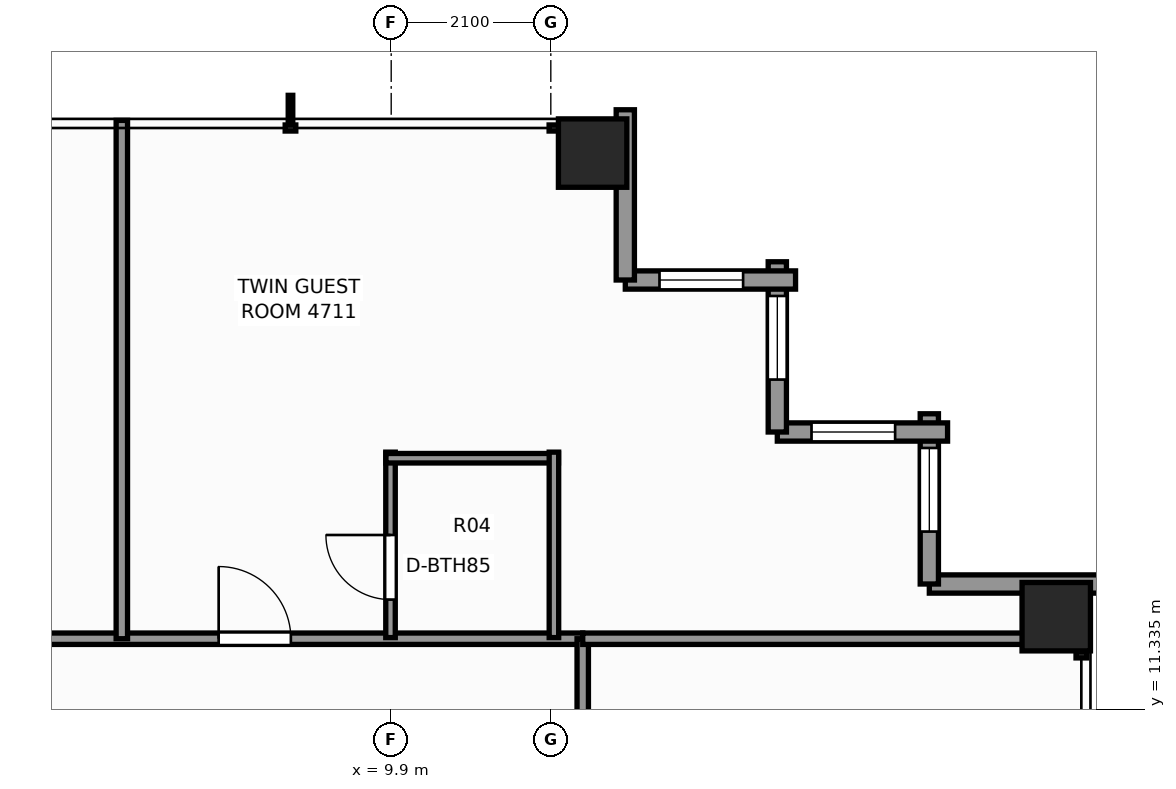
"""IFC4 building model, lengths in metres.
Left out: names, types, materials, properties, quantities, classifications, styles, units other than length and angle.
Written with IfcOpenShell. Run it as: python <this file> out.ifc"""

import sys

from ifc_helpers import new_model, si_unit, direction, frame, frame_2d, origin, origin_2d, place, context, subcontext, project, spatial, rectangle, extrude, element, fill, save


model = new_model("IFC4")
c1 = context("Model", 3, precision=1e-05, world=origin(), true_north=direction((0.0, 1.0)))
c2 = subcontext(c1, "Body", "Model", "MODEL_VIEW")
j1 = project(units=[si_unit("LENGTHUNIT", "METRE"), si_unit("PLANEANGLEUNIT", "RADIAN")], contexts=[c1])
p1 = place(None, origin())
s1 = spatial("IfcSite", under=j1, at=p1, CompositionType="ELEMENT")
p2 = place(p1, origin())
s2 = spatial("IfcBuilding", under=s1, at=p2, CompositionType="ELEMENT")
p3 = place(p2, frame((0.0, 0.0, 163.5)))
s3 = spatial("IfcBuildingStorey", under=s2, at=p3, CompositionType="ELEMENT", Elevation=163.5)
for number, where, z_axis, x_axis in (
    (1, (12.55, 18.65, 0.0), (0.0, 0.0, 1.0), (1.0, 0.0, 0.0)),
    (2, (18.65, 12.55, 0.0), (0.0, 0.0, 1.0), (1.0, 0.0, 0.0)),
):
    element("IfcColumn", number, at=place(p3, frame(where, z_axis=z_axis, x_axis=x_axis)), inside=s3, PredefinedType="COLUMN", context=c2, shape_type="SweptSolid", body=[
        extrude(rectangle(XDim=0.9, YDim=0.9, at=origin_2d()), origin(), (0.0, 0.0, 1.0), 3.3),
    ])
p4 = place(p3, frame((16.98, 12.98, 0.0), z_axis=(0.0, 0.0, 1.0), x_axis=(1.0, 0.0, 0.0)))
e3 = element("IfcWall", 3, at=p4, inside=s3, PredefinedType="STANDARD", context=c2, shape_type="SweptSolid", body=[
    extrude(rectangle(XDim=2.24, YDim=0.24, at=frame_2d((1.12, 0.0))), origin(), (0.0, 0.0, 1.0), 2.483),
])
p5 = place(p3, frame((16.98, 15.22, 0.0), z_axis=(0.0, 0.0, 1.0), x_axis=(0.0, -1.0, 0.0)))
e4 = element("IfcWall", 4, at=p5, inside=s3, PredefinedType="STANDARD", context=c2, shape_type="SweptSolid", body=[
    extrude(rectangle(XDim=2.24, YDim=0.24, at=frame_2d((1.12, 0.0))), origin(), (0.0, 0.0, 1.0), 2.483),
])
p6 = place(p5, frame((0.45, 0.0, 0.65)))
e5 = element("IfcOpeningElement", 5, at=p6, cuts=e4, PredefinedType="OPENING", context=c2, shape_type="SweptSolid", body=[
    extrude(rectangle(XDim=1.1, YDim=1.45, at=frame_2d((0.55, 0.725))), frame((0.0, 0.13, 0.0), z_axis=(0.0, -1.0, 0.0), x_axis=(1.0, 0.0, 0.0)), (0.0, 0.0, 1.0), 0.26),
])
p7 = place(p3, frame((14.98, 14.98, 0.0), z_axis=(0.0, 0.0, 1.0), x_axis=(1.0, 0.0, 0.0)))
e6 = element("IfcWall", 6, at=p7, inside=s3, PredefinedType="STANDARD", context=c2, shape_type="SweptSolid", body=[
    extrude(rectangle(XDim=2.24, YDim=0.24, at=frame_2d((1.12, 0.0))), origin(), (0.0, 0.0, 1.0), 2.483),
])
p8 = place(p7, frame((0.45, 0.0, 0.65)))
e7 = element("IfcOpeningElement", 7, at=p8, cuts=e6, PredefinedType="OPENING", context=c2, shape_type="SweptSolid", body=[
    extrude(rectangle(XDim=1.1, YDim=1.45, at=frame_2d((0.55, 0.725))), frame((0.0, 0.13, 0.0), z_axis=(0.0, -1.0, 0.0), x_axis=(1.0, 0.0, 0.0)), (0.0, 0.0, 1.0), 0.26),
])
p9 = place(p3, frame((14.98, 17.22, 0.0), z_axis=(0.0, 0.0, 1.0), x_axis=(0.0, -1.0, 0.0)))
e8 = element("IfcWall", 8, at=p9, inside=s3, PredefinedType="STANDARD", context=c2, shape_type="SweptSolid", body=[
    extrude(rectangle(XDim=2.24, YDim=0.24, at=frame_2d((1.12, 0.0))), origin(), (0.0, 0.0, 1.0), 2.483),
])
p10 = place(p9, frame((0.45, 0.0, 0.65)))
e9 = element("IfcOpeningElement", 9, at=p10, cuts=e8, PredefinedType="OPENING", context=c2, shape_type="SweptSolid", body=[
    extrude(rectangle(XDim=1.1, YDim=1.45, at=frame_2d((0.55, 0.725))), frame((0.0, 0.13, 0.0), z_axis=(0.0, -1.0, 0.0), x_axis=(1.0, 0.0, 0.0)), (0.0, 0.0, 1.0), 0.26),
])
p11 = place(p3, frame((12.98, 16.98, 0.0), z_axis=(0.0, 0.0, 1.0), x_axis=(1.0, 0.0, 0.0)))
e10 = element("IfcWall", 10, at=p11, inside=s3, PredefinedType="STANDARD", context=c2, shape_type="SweptSolid", body=[
    extrude(rectangle(XDim=2.24, YDim=0.24, at=frame_2d((1.12, 0.0))), origin(), (0.0, 0.0, 1.0), 2.483),
])
p12 = place(p11, frame((0.45, 0.0, 0.65)))
e11 = element("IfcOpeningElement", 11, at=p12, cuts=e10, PredefinedType="OPENING", context=c2, shape_type="SweptSolid", body=[
    extrude(rectangle(XDim=1.1, YDim=1.45, at=frame_2d((0.55, 0.725))), frame((0.0, 0.13, 0.0), z_axis=(0.0, -1.0, 0.0), x_axis=(1.0, 0.0, 0.0)), (0.0, 0.0, 1.0), 0.26),
])
p13 = place(p3, frame((12.98, 19.22, 0.0), z_axis=(0.0, 0.0, 1.0), x_axis=(0.0, -1.0, 0.0)))
e12 = element("IfcWall", 12, at=p13, inside=s3, PredefinedType="STANDARD", context=c2, shape_type="SweptSolid", body=[
    extrude(rectangle(XDim=2.24, YDim=0.24, at=frame_2d((1.12, 0.0))), origin(), (0.0, 0.0, 1.0), 2.483),
])
p14 = place(p3, frame((-12.42, 12.26, 0.0), z_axis=(0.0, 0.0, 1.0), x_axis=(1.0, 0.0, 0.0)))
e13 = element("IfcWall", 13, at=p14, inside=s3, PredefinedType="PARTITIONING", context=c2, shape_type="SweptSolid", body=[
    extrude(rectangle(XDim=24.84, YDim=0.15, at=frame_2d((12.42, 0.0))), origin(), (0.0, 0.0, 1.0), 2.389),
])
p15 = place(p14, frame((3.541, 0.0, 0.0)))
e14 = element("IfcOpeningElement", 14, at=p15, cuts=e13, PredefinedType="OPENING", context=c2, shape_type="SweptSolid", body=[
    extrude(rectangle(XDim=0.95, YDim=2.06, at=frame_2d((0.475, 1.03))), frame((0.0, 0.085, 0.0), z_axis=(0.0, -1.0, 0.0), x_axis=(1.0, 0.0, 0.0)), (0.0, 0.0, 1.0), 0.17),
])
p16 = place(p14, frame((13.975, 0.0, 0.0)))
e15 = element("IfcOpeningElement", 15, at=p16, cuts=e13, PredefinedType="OPENING", context=c2, shape_type="SweptSolid", body=[
    extrude(rectangle(XDim=0.95, YDim=2.06, at=frame_2d((0.475, 1.03))), frame((0.0, 0.085, 0.0), z_axis=(0.0, -1.0, 0.0), x_axis=(1.0, 0.0, 0.0)), (0.0, 0.0, 1.0), 0.17),
])
p17 = place(p14, frame((20.05, 0.0, 0.0)))
e16 = element("IfcOpeningElement", 16, at=p17, cuts=e13, PredefinedType="OPENING", context=c2, shape_type="SweptSolid", body=[
    extrude(rectangle(XDim=0.95, YDim=2.06, at=frame_2d((0.475, 1.03))), frame((0.0, 0.085, 0.0), z_axis=(0.0, -1.0, 0.0), x_axis=(1.0, 0.0, 0.0)), (0.0, 0.0, 1.0), 0.17),
])
p18 = place(p3, frame((12.42, -12.58, 0.0), z_axis=(0.0, 0.0, 1.0), x_axis=(0.0, 1.0, 0.0)))
e17 = element("IfcWall", 17, at=p18, inside=s3, PredefinedType="PARTITIONING", context=c2, shape_type="SweptSolid", body=[
    extrude(rectangle(XDim=24.84, YDim=0.15, at=frame_2d((12.42, 0.0))), origin(), (0.0, 0.0, 1.0), 2.389),
])
p19 = place(p18, frame((4.595, 0.0, 0.0)))
e18 = element("IfcOpeningElement", 18, at=p19, cuts=e17, PredefinedType="OPENING", context=c2, shape_type="SweptSolid", body=[
    extrude(rectangle(XDim=0.9, YDim=2.06, at=frame_2d((0.45, 1.03))), frame((0.0, 0.085, 0.0), z_axis=(0.0, -1.0, 0.0), x_axis=(1.0, 0.0, 0.0)), (0.0, 0.0, 1.0), 0.17),
])
p20 = place(p18, frame((14.16, 0.0, 0.0)))
e19 = element("IfcOpeningElement", 19, at=p20, cuts=e17, PredefinedType="OPENING", context=c2, shape_type="SweptSolid", body=[
    extrude(rectangle(XDim=0.9, YDim=2.06, at=frame_2d((0.45, 1.03))), frame((0.0, 0.085, 0.0), z_axis=(0.0, -1.0, 0.0), x_axis=(1.0, 0.0, 0.0)), (0.0, 0.0, 1.0), 0.17),
])
p21 = place(p18, frame((18.919, 0.0, 0.0)))
e20 = element("IfcOpeningElement", 20, at=p21, cuts=e17, PredefinedType="OPENING", context=c2, shape_type="SweptSolid", body=[
    extrude(rectangle(XDim=0.9, YDim=2.06, at=frame_2d((0.45, 1.03))), frame((0.0, 0.085, 0.0), z_axis=(0.0, -1.0, 0.0), x_axis=(1.0, 0.0, 0.0)), (0.0, 0.0, 1.0), 0.17),
])
p22 = place(p18, frame((21.254, 0.0, 0.0)))
e21 = element("IfcOpeningElement", 21, at=p22, cuts=e17, PredefinedType="OPENING", context=c2, shape_type="SweptSolid", body=[
    extrude(rectangle(XDim=0.9, YDim=2.06, at=frame_2d((0.45, 1.03))), frame((0.0, 0.085, 0.0), z_axis=(0.0, -1.0, 0.0), x_axis=(1.0, 0.0, 0.0)), (0.0, 0.0, 1.0), 0.17),
])
p23 = place(p3, frame((12.42, 12.26, 0.0), z_axis=(0.0, 0.0, 1.0), x_axis=(1.0, 0.0, 0.0)))
e22 = element("IfcWall", 22, at=p23, inside=s3, PredefinedType="PARTITIONING", context=c2, shape_type="SweptSolid", body=[
    extrude(rectangle(XDim=6.66, YDim=0.15, at=frame_2d((3.33, 0.0))), origin(), (0.0, 0.0, 1.0), 2.389),
])
p24 = place(p3, frame((6.356, 12.26, 0.0), z_axis=(0.0, 0.0, 1.0), x_axis=(0.0, 1.0, 0.0)))
e23 = element("IfcWall", 23, at=p24, inside=s3, PredefinedType="PARTITIONING", context=c2, shape_type="SweptSolid", body=[
    extrude(rectangle(XDim=6.82, YDim=0.15, at=frame_2d((3.41, 0.0))), origin(), (0.0, 0.0, 1.0), 2.473),
])
p25 = place(p3, frame((9.891, 12.275, 0.0), z_axis=(0.0, 0.0, 1.0), x_axis=(0.0, 1.0, 0.0)))
e24 = element("IfcWall", 24, at=p25, inside=s3, PredefinedType="PARTITIONING", context=c2, shape_type="SweptSolid", body=[
    extrude(rectangle(XDim=2.44, YDim=0.125, at=frame_2d((1.22, 0.0))), origin(), (0.0, 0.0, 1.0), 3.1),
])
p26 = place(p25, frame((0.5, 0.0, 0.0)))
e25 = element("IfcOpeningElement", 25, at=p26, cuts=e24, PredefinedType="OPENING", context=c2, shape_type="SweptSolid", body=[
    extrude(rectangle(XDim=0.85, YDim=2.03, at=frame_2d((0.425, 1.015))), frame((0.0, 0.073, 0.0), z_axis=(0.0, -1.0, 0.0), x_axis=(1.0, 0.0, 0.0)), (0.0, 0.0, 1.0), 0.145),
])
p27 = place(p3, frame((9.831, 14.635, 0.0), z_axis=(0.0, 0.0, 1.0), x_axis=(1.0, 0.0, 0.0)))
e26 = element("IfcWall", 26, at=p27, inside=s3, PredefinedType="PARTITIONING", context=c2, shape_type="SweptSolid", body=[
    extrude(rectangle(XDim=2.27, YDim=0.125, at=frame_2d((1.135, 0.0))), origin(), (0.0, 0.0, 1.0), 2.389),
])
p28 = place(p3, frame((12.041, 12.275, 0.0), z_axis=(0.0, 0.0, 1.0), x_axis=(0.0, 1.0, 0.0)))
e27 = element("IfcWall", 27, at=p28, inside=s3, PredefinedType="PARTITIONING", context=c2, shape_type="SweptSolid", body=[
    extrude(rectangle(XDim=2.44, YDim=0.125, at=frame_2d((1.22, 0.0))), origin(), (0.0, 0.0, 1.0), 3.1),
])
p29 = place(p6, origin())
e28 = element("IfcWindow", 28, at=p29, inside=s3, PartitioningType="SINGLE_PANEL", PredefinedType="WINDOW", context=c2, shape_type="SweptSolid", body=[
    extrude(rectangle(XDim=1.1, YDim=1.45, at=frame_2d((0.55, 0.725))), frame((0.0, 0.03, 0.0), z_axis=(0.0, -1.0, 0.0), x_axis=(1.0, 0.0, 0.0)), (0.0, 0.0, 1.0), 0.06),
])
fill(e5, e28)
p30 = place(p8, origin())
e29 = element("IfcWindow", 29, at=p30, inside=s3, PartitioningType="SINGLE_PANEL", PredefinedType="WINDOW", context=c2, shape_type="SweptSolid", body=[
    extrude(rectangle(XDim=1.1, YDim=1.45, at=frame_2d((0.55, 0.725))), frame((0.0, 0.03, 0.0), z_axis=(0.0, -1.0, 0.0), x_axis=(1.0, 0.0, 0.0)), (0.0, 0.0, 1.0), 0.06),
])
fill(e7, e29)
p31 = place(p10, origin())
e30 = element("IfcWindow", 30, at=p31, inside=s3, PartitioningType="SINGLE_PANEL", PredefinedType="WINDOW", context=c2, shape_type="SweptSolid", body=[
    extrude(rectangle(XDim=1.1, YDim=1.45, at=frame_2d((0.55, 0.725))), frame((0.0, 0.03, 0.0), z_axis=(0.0, -1.0, 0.0), x_axis=(1.0, 0.0, 0.0)), (0.0, 0.0, 1.0), 0.06),
])
fill(e9, e30)
p32 = place(p12, origin())
e31 = element("IfcWindow", 31, at=p32, inside=s3, PartitioningType="SINGLE_PANEL", PredefinedType="WINDOW", context=c2, shape_type="SweptSolid", body=[
    extrude(rectangle(XDim=1.1, YDim=1.45, at=frame_2d((0.55, 0.725))), frame((0.0, 0.03, 0.0), z_axis=(0.0, -1.0, 0.0), x_axis=(1.0, 0.0, 0.0)), (0.0, 0.0, 1.0), 0.06),
])
fill(e11, e31)
p33 = place(p26, origin())
e32 = element("IfcDoor", 32, at=p33, inside=s3, OperationType="SINGLE_SWING_RIGHT", PredefinedType="DOOR", context=c2, shape_type="SweptSolid", body=[
    extrude(rectangle(XDim=0.85, YDim=2.03, at=frame_2d((0.425, 1.015))), frame((0.0, 0.025, 0.0), z_axis=(0.0, -1.0, 0.0), x_axis=(1.0, 0.0, 0.0)), (0.0, 0.0, 1.0), 0.05),
])
fill(e25, e32)
p34 = place(p17, origin())
e33 = element("IfcDoor", 33, at=p34, inside=s3, OperationType="SINGLE_SWING_LEFT", PredefinedType="DOOR", context=c2, shape_type="SweptSolid", body=[
    extrude(rectangle(XDim=0.95, YDim=2.06, at=frame_2d((0.475, 1.03))), frame((0.0, 0.025, 0.0), z_axis=(0.0, -1.0, 0.0), x_axis=(1.0, 0.0, 0.0)), (0.0, 0.0, 1.0), 0.05),
])
fill(e16, e33)
save(model, sys.argv[1])
